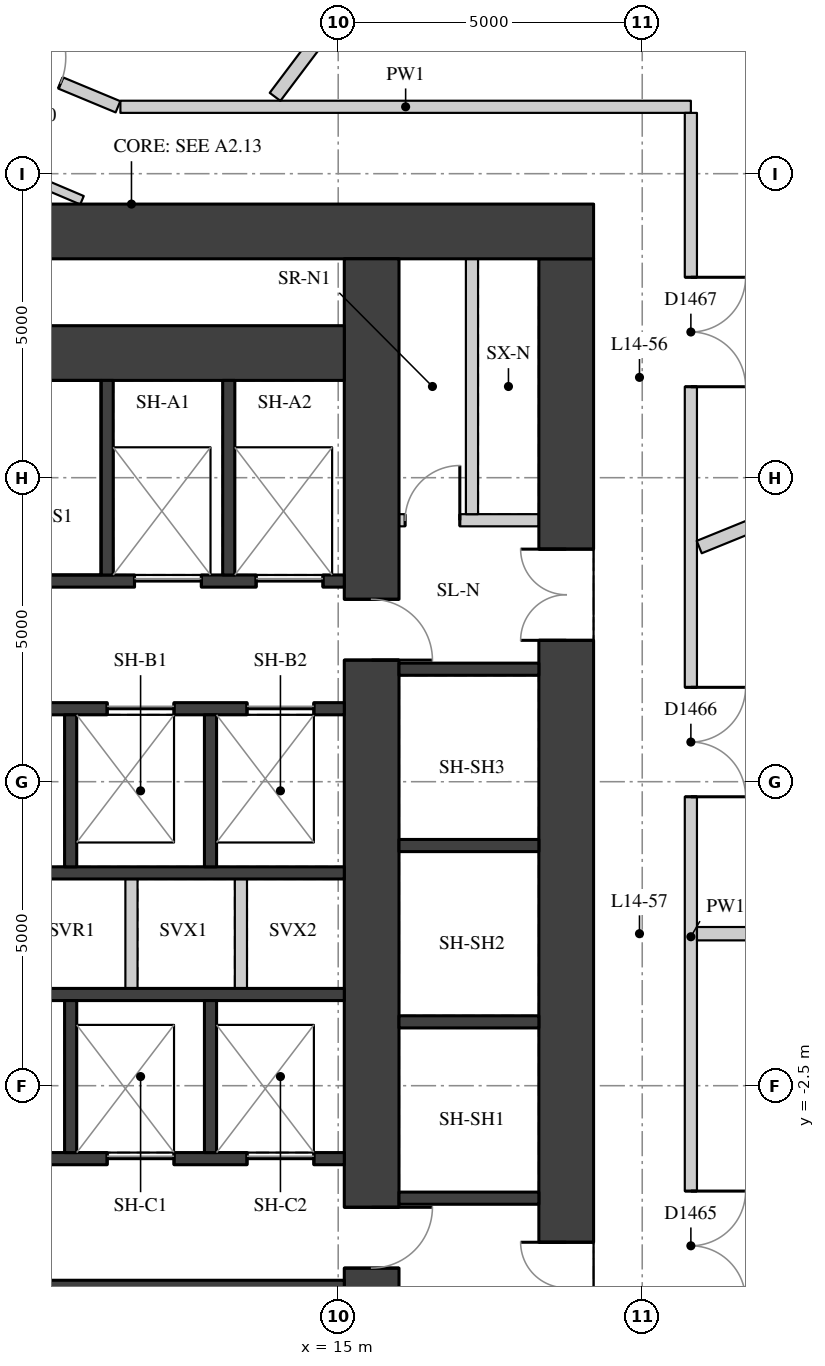
"""IFC4 building model, lengths in metres.
Left out: names, types, materials, properties, quantities, classifications, styles, units other than length and angle.
Written with IfcOpenShell. Run it as: python <this file> out.ifc"""

import sys

from ifc_helpers import new_model, si_unit, direction, frame, frame_2d, origin, place, context, subcontext, project, spatial, rectangle, extrude, element, fill, save


model = new_model("IFC4")
c1 = context("Model", 3, precision=1e-05, world=origin(), true_north=direction((0.0, 1.0)))
c2 = subcontext(c1, "Body", "Model", "MODEL_VIEW")
j1 = project(units=[si_unit("LENGTHUNIT", "METRE"), si_unit("PLANEANGLEUNIT", "RADIAN")], contexts=[c1])
p1 = place(None, origin())
s1 = spatial("IfcSite", under=j1, at=p1, CompositionType="ELEMENT")
p2 = place(p1, origin())
s2 = spatial("IfcBuilding", under=s1, at=p2, CompositionType="ELEMENT")
p3 = place(p2, frame((0.0, 0.0, 54.7)))
s3 = spatial("IfcBuildingStorey", under=s2, at=p3, CompositionType="ELEMENT", Elevation=54.7)
p4 = place(p3, frame((18.75, -11.1, 0.0), z_axis=(0.0, 0.0, 1.0), x_axis=(0.0, 1.0, 0.0)))
e1 = element("IfcWall", 1, at=p4, inside=s3, PredefinedType="SHEAR", context=c2, shape_type="SweptSolid", body=[
    extrude(rectangle(XDim=22.2, YDim=0.9, at=frame_2d((11.1, 0.0))), origin(), (0.0, 0.0, 1.0), 3.02),
])
p5 = place(p4, frame((15.925, 0.0, 0.0)))
e2 = element("IfcOpeningElement", 2, at=p5, cuts=e1, PredefinedType="OPENING", context=c2, shape_type="SweptSolid", body=[
    extrude(rectangle(XDim=1.5, YDim=2.1, at=frame_2d((0.75, 1.05))), frame((0.0, 0.46, 0.0), z_axis=(0.0, -1.0, 0.0), x_axis=(1.0, 0.0, 0.0)), (0.0, 0.0, 1.0), 0.92),
])
p6 = place(p4, frame((4.525, 0.0, 0.0)))
e3 = element("IfcOpeningElement", 3, at=p6, cuts=e1, PredefinedType="OPENING", context=c2, shape_type="SweptSolid", body=[
    extrude(rectangle(XDim=1.5, YDim=2.1, at=frame_2d((0.75, 1.05))), frame((0.0, 0.46, 0.0), z_axis=(0.0, -1.0, 0.0), x_axis=(1.0, 0.0, 0.0)), (0.0, 0.0, 1.0), 0.92),
])
p7 = place(p3, frame((4.0, 11.55, 0.0), z_axis=(0.0, 0.0, 1.0), x_axis=(1.0, 0.0, 0.0)))
e4 = element("IfcWall", 4, at=p7, inside=s3, PredefinedType="SHEAR", context=c2, shape_type="SweptSolid", body=[
    extrude(rectangle(XDim=15.2, YDim=0.9, at=frame_2d((7.6, 0.0))), origin(), (0.0, 0.0, 1.0), 3.02),
])
p8 = place(p3, frame((15.55, -11.1, 0.0), z_axis=(0.0, 0.0, 1.0), x_axis=(0.0, 1.0, 0.0)))
e5 = element("IfcWall", 5, at=p8, inside=s3, PredefinedType="SHEAR", context=c2, shape_type="SweptSolid", body=[
    extrude(rectangle(XDim=22.2, YDim=0.9, at=frame_2d((11.1, 0.0))), origin(), (0.0, 0.0, 1.0), 3.02),
])
p9 = place(p8, frame((15.6, 0.0, 0.0)))
e6 = element("IfcOpeningElement", 6, at=p9, cuts=e5, PredefinedType="OPENING", context=c2, shape_type="SweptSolid", body=[
    extrude(rectangle(XDim=1.0, YDim=2.1, at=frame_2d((0.5, 1.05))), frame((0.0, 0.46, 0.0), z_axis=(0.0, -1.0, 0.0), x_axis=(1.0, 0.0, 0.0)), (0.0, 0.0, 1.0), 0.92),
])
p10 = place(p8, frame((5.6, 0.0, 0.0)))
e7 = element("IfcOpeningElement", 7, at=p10, cuts=e5, PredefinedType="OPENING", context=c2, shape_type="SweptSolid", body=[
    extrude(rectangle(XDim=1.0, YDim=2.1, at=frame_2d((0.5, 1.05))), frame((0.0, 0.46, 0.0), z_axis=(0.0, -1.0, 0.0), x_axis=(1.0, 0.0, 0.0)), (0.0, 0.0, 1.0), 0.92),
])
p11 = place(p3, frame((4.9, 9.55, 0.0), z_axis=(0.0, 0.0, 1.0), x_axis=(1.0, 0.0, 0.0)))
e8 = element("IfcWall", 8, at=p11, inside=s3, PredefinedType="SHEAR", context=c2, shape_type="SweptSolid", body=[
    extrude(rectangle(XDim=10.2, YDim=0.9, at=frame_2d((5.1, 0.0))), origin(), (0.0, 0.0, 1.0), 3.02),
])
p12 = place(p3, frame((4.9, 5.8, 0.0), z_axis=(0.0, 0.0, 1.0), x_axis=(1.0, 0.0, 0.0)))
e9 = element("IfcWall", 9, at=p12, inside=s3, PredefinedType="SHEAR", context=c2, shape_type="SweptSolid", body=[
    extrude(rectangle(XDim=10.2, YDim=0.2, at=frame_2d((5.1, 0.0))), origin(), (0.0, 0.0, 1.0), 3.02),
])
p13 = place(p12, frame((6.75, 0.0, 0.0)))
e10 = element("IfcOpeningElement", 10, at=p13, cuts=e9, PredefinedType="OPENING", context=c2, shape_type="SweptSolid", body=[
    extrude(rectangle(XDim=1.1, YDim=2.1, at=frame_2d((0.55, 1.05))), frame((0.0, 0.11, 0.0), z_axis=(0.0, -1.0, 0.0), x_axis=(1.0, 0.0, 0.0)), (0.0, 0.0, 1.0), 0.22),
])
p14 = place(p12, frame((8.75, 0.0, 0.0)))
e11 = element("IfcOpeningElement", 11, at=p14, cuts=e9, PredefinedType="OPENING", context=c2, shape_type="SweptSolid", body=[
    extrude(rectangle(XDim=1.1, YDim=2.1, at=frame_2d((0.55, 1.05))), frame((0.0, 0.11, 0.0), z_axis=(0.0, -1.0, 0.0), x_axis=(1.0, 0.0, 0.0)), (0.0, 0.0, 1.0), 0.22),
])
p15 = place(p3, frame((4.9, 3.7, 0.0), z_axis=(0.0, 0.0, 1.0), x_axis=(1.0, 0.0, 0.0)))
e12 = element("IfcWall", 12, at=p15, inside=s3, PredefinedType="SHEAR", context=c2, shape_type="SweptSolid", body=[
    extrude(rectangle(XDim=10.2, YDim=0.2, at=frame_2d((5.1, 0.0))), origin(), (0.0, 0.0, 1.0), 3.02),
])
p16 = place(p15, frame((6.3, 0.0, 0.0)))
e13 = element("IfcOpeningElement", 13, at=p16, cuts=e12, PredefinedType="OPENING", context=c2, shape_type="SweptSolid", body=[
    extrude(rectangle(XDim=1.1, YDim=2.1, at=frame_2d((0.55, 1.05))), frame((0.0, 0.11, 0.0), z_axis=(0.0, -1.0, 0.0), x_axis=(1.0, 0.0, 0.0)), (0.0, 0.0, 1.0), 0.22),
])
p17 = place(p15, frame((8.6, 0.0, 0.0)))
e14 = element("IfcOpeningElement", 14, at=p17, cuts=e12, PredefinedType="OPENING", context=c2, shape_type="SweptSolid", body=[
    extrude(rectangle(XDim=1.1, YDim=2.1, at=frame_2d((0.55, 1.05))), frame((0.0, 0.11, 0.0), z_axis=(0.0, -1.0, 0.0), x_axis=(1.0, 0.0, 0.0)), (0.0, 0.0, 1.0), 0.22),
])
for number, where, z_axis, x_axis in (
    (15, (4.9, 1.0, 0.0), (0.0, 0.0, 1.0), (1.0, 0.0, 0.0)),
    (16, (4.9, -1.0, 0.0), (0.0, 0.0, 1.0), (1.0, 0.0, 0.0)),
):
    element("IfcWall", number, at=place(p3, frame(where, z_axis=z_axis, x_axis=x_axis)), inside=s3, PredefinedType="SHEAR", context=c2, shape_type="SweptSolid", body=[
        extrude(rectangle(XDim=10.2, YDim=0.2, at=frame_2d((5.1, 0.0))), origin(), (0.0, 0.0, 1.0), 3.02),
    ])
p18 = place(p3, frame((4.9, -3.7, 0.0), z_axis=(0.0, 0.0, 1.0), x_axis=(1.0, 0.0, 0.0)))
e17 = element("IfcWall", 17, at=p18, inside=s3, PredefinedType="SHEAR", context=c2, shape_type="SweptSolid", body=[
    extrude(rectangle(XDim=10.2, YDim=0.2, at=frame_2d((5.1, 0.0))), origin(), (0.0, 0.0, 1.0), 3.02),
])
p19 = place(p18, frame((6.3, 0.0, 0.0)))
e18 = element("IfcOpeningElement", 18, at=p19, cuts=e17, PredefinedType="OPENING", context=c2, shape_type="SweptSolid", body=[
    extrude(rectangle(XDim=1.1, YDim=2.1, at=frame_2d((0.55, 1.05))), frame((0.0, 0.11, 0.0), z_axis=(0.0, -1.0, 0.0), x_axis=(1.0, 0.0, 0.0)), (0.0, 0.0, 1.0), 0.22),
])
p20 = place(p18, frame((8.6, 0.0, 0.0)))
e19 = element("IfcOpeningElement", 19, at=p20, cuts=e17, PredefinedType="OPENING", context=c2, shape_type="SweptSolid", body=[
    extrude(rectangle(XDim=1.1, YDim=2.1, at=frame_2d((0.55, 1.05))), frame((0.0, 0.11, 0.0), z_axis=(0.0, -1.0, 0.0), x_axis=(1.0, 0.0, 0.0)), (0.0, 0.0, 1.0), 0.22),
])
p21 = place(p3, frame((4.9, -5.8, 0.0), z_axis=(0.0, 0.0, 1.0), x_axis=(1.0, 0.0, 0.0)))
e20 = element("IfcWall", 20, at=p21, inside=s3, PredefinedType="SHEAR", context=c2, shape_type="SweptSolid", body=[
    extrude(rectangle(XDim=10.2, YDim=0.2, at=frame_2d((5.1, 0.0))), origin(), (0.0, 0.0, 1.0), 3.02),
])
for number, where, z_axis, x_axis in (
    (21, (11.2, 5.9, 0.0), (0.0, 0.0, 1.0), (0.0, 1.0, 0.0)),
    (22, (13.2, 5.9, 0.0), (0.0, 0.0, 1.0), (0.0, 1.0, 0.0)),
):
    element("IfcWall", number, at=place(p3, frame(where, z_axis=z_axis, x_axis=x_axis)), inside=s3, PredefinedType="SHEAR", context=c2, shape_type="SweptSolid", body=[
        extrude(rectangle(XDim=3.2, YDim=0.2, at=frame_2d((1.6, 0.0))), origin(), (0.0, 0.0, 1.0), 3.02),
    ])
for number, where, z_axis, x_axis in (
    (23, (10.6, 1.1, 0.0), (0.0, 0.0, 1.0), (0.0, 1.0, 0.0)),
    (24, (10.6, -3.6, 0.0), (0.0, 0.0, 1.0), (0.0, 1.0, 0.0)),
    (25, (12.9, 1.1, 0.0), (0.0, 0.0, 1.0), (0.0, 1.0, 0.0)),
    (26, (12.9, -3.6, 0.0), (0.0, 0.0, 1.0), (0.0, 1.0, 0.0)),
):
    element("IfcWall", number, at=place(p3, frame(where, z_axis=z_axis, x_axis=x_axis)), inside=s3, PredefinedType="SHEAR", context=c2, shape_type="SweptSolid", body=[
        extrude(rectangle(XDim=2.5, YDim=0.2, at=frame_2d((1.25, 0.0))), origin(), (0.0, 0.0, 1.0), 3.02),
    ])
for number, where, z_axis, x_axis in (
    (27, (11.6, -0.9, 0.0), (0.0, 0.0, 1.0), (0.0, 1.0, 0.0)),
    (28, (13.4, -0.9, 0.0), (0.0, 0.0, 1.0), (0.0, 1.0, 0.0)),
):
    element("IfcWall", number, at=place(p3, frame(where, z_axis=z_axis, x_axis=x_axis)), inside=s3, PredefinedType="PARTITIONING", context=c2, shape_type="SweptSolid", body=[
        extrude(rectangle(XDim=1.8, YDim=0.2, at=frame_2d((0.9, 0.0))), origin(), (0.0, 0.0, 1.0), 3.02),
    ])
for number, where, z_axis, x_axis in (
    (29, (16.0, -4.35, 0.0), (0.0, 0.0, 1.0), (1.0, 0.0, 0.0)),
    (30, (16.0, -1.45, 0.0), (0.0, 0.0, 1.0), (1.0, 0.0, 0.0)),
    (31, (16.0, 1.45, 0.0), (0.0, 0.0, 1.0), (1.0, 0.0, 0.0)),
    (32, (16.0, 4.35, 0.0), (0.0, 0.0, 1.0), (1.0, 0.0, 0.0)),
):
    element("IfcWall", number, at=place(p3, frame(where, z_axis=z_axis, x_axis=x_axis)), inside=s3, PredefinedType="SHEAR", context=c2, shape_type="SweptSolid", body=[
        extrude(rectangle(XDim=2.3, YDim=0.2, at=frame_2d((1.15, 0.0))), origin(), (0.0, 0.0, 1.0), 3.02),
    ])
p22 = place(p3, frame((16.0, 6.8, 0.0), z_axis=(0.0, 0.0, 1.0), x_axis=(1.0, 0.0, 0.0)))
e33 = element("IfcWall", 33, at=p22, inside=s3, PredefinedType="PARTITIONING", context=c2, shape_type="SweptSolid", body=[
    extrude(rectangle(XDim=2.3, YDim=0.2, at=frame_2d((1.15, 0.0))), origin(), (0.0, 0.0, 1.0), 3.02),
])
p23 = place(p22, frame((0.1, 0.0, 0.0)))
e34 = element("IfcOpeningElement", 34, at=p23, cuts=e33, PredefinedType="OPENING", context=c2, shape_type="SweptSolid", body=[
    extrude(rectangle(XDim=0.9, YDim=2.1, at=frame_2d((0.45, 1.05))), frame((0.0, 0.11, 0.0), z_axis=(0.0, -1.0, 0.0), x_axis=(1.0, 0.0, 0.0)), (0.0, 0.0, 1.0), 0.22),
])
p24 = place(p3, frame((17.2, 6.9, 0.0), z_axis=(0.0, 0.0, 1.0), x_axis=(0.0, 1.0, 0.0)))
e35 = element("IfcWall", 35, at=p24, inside=s3, PredefinedType="PARTITIONING", context=c2, shape_type="SweptSolid", body=[
    extrude(rectangle(XDim=4.2, YDim=0.2, at=frame_2d((2.1, 0.0))), origin(), (0.0, 0.0, 1.0), 3.02),
])
p25 = place(p3, frame((3.739, 16.776, 0.0), z_axis=(0.0, 0.0, 1.0), x_axis=(0.923364778497, -0.383923802117, 0.0)))
e36 = element("IfcWall", 36, at=p25, inside=s3, PredefinedType="PARTITIONING", context=c2, shape_type="SweptSolid", body=[
    extrude(rectangle(XDim=8.273, YDim=0.2, at=frame_2d((4.137, 0.0))), origin(), (0.0, 0.0, 1.0), 3.02),
])
p26 = place(p25, frame((6.153, 0.0, 0.0)))
e37 = element("IfcOpeningElement", 37, at=p26, cuts=e36, PredefinedType="OPENING", context=c2, shape_type="SweptSolid", body=[
    extrude(rectangle(XDim=1.1, YDim=2.1, at=frame_2d((0.55, 1.05))), frame((0.0, 0.11, 0.0), z_axis=(0.0, -1.0, 0.0), x_axis=(1.0, 0.0, 0.0)), (0.0, 0.0, 1.0), 0.22),
])
p27 = place(p25, frame((1.298, 0.0, 0.0)))
e38 = element("IfcOpeningElement", 38, at=p27, cuts=e36, PredefinedType="OPENING", context=c2, shape_type="SweptSolid", body=[
    extrude(rectangle(XDim=0.9, YDim=2.1, at=frame_2d((0.45, 1.05))), frame((0.0, 0.11, 0.0), z_axis=(0.0, -1.0, 0.0), x_axis=(1.0, 0.0, 0.0)), (0.0, 0.0, 1.0), 0.22),
])
p28 = place(p3, frame((11.418, 13.6, 0.0), z_axis=(0.0, 0.0, 1.0), x_axis=(1.0, 0.0, 0.0)))
e39 = element("IfcWall", 39, at=p28, inside=s3, PredefinedType="PARTITIONING", context=c2, shape_type="SweptSolid", body=[
    extrude(rectangle(XDim=9.382, YDim=0.2, at=frame_2d((4.691, 0.0))), origin(), (0.0, 0.0, 1.0), 3.02),
])
p29 = place(p3, frame((20.8, 13.5, 0.0), z_axis=(0.0, 0.0, 1.0), x_axis=(0.0, -1.0, 0.0)))
e40 = element("IfcWall", 40, at=p29, inside=s3, PredefinedType="PARTITIONING", context=c2, shape_type="SweptSolid", body=[
    extrude(rectangle(XDim=27.1, YDim=0.2, at=frame_2d((13.55, 0.0))), origin(), (0.0, 0.0, 1.0), 3.02),
])
p30 = place(p29, frame((17.733, 0.0, 0.0)))
e41 = element("IfcOpeningElement", 41, at=p30, cuts=e40, PredefinedType="OPENING", context=c2, shape_type="SweptSolid", body=[
    extrude(rectangle(XDim=1.8, YDim=2.1, at=frame_2d((0.9, 1.05))), frame((0.0, 0.11, 0.0), z_axis=(0.0, -1.0, 0.0), x_axis=(1.0, 0.0, 0.0)), (0.0, 0.0, 1.0), 0.22),
])
p31 = place(p29, frame((9.448, 0.0, 0.0)))
e42 = element("IfcOpeningElement", 42, at=p31, cuts=e40, PredefinedType="OPENING", context=c2, shape_type="SweptSolid", body=[
    extrude(rectangle(XDim=1.8, YDim=2.1, at=frame_2d((0.9, 1.05))), frame((0.0, 0.11, 0.0), z_axis=(0.0, -1.0, 0.0), x_axis=(1.0, 0.0, 0.0)), (0.0, 0.0, 1.0), 0.22),
])
p32 = place(p29, frame((2.704, 0.0, 0.0)))
e43 = element("IfcOpeningElement", 43, at=p32, cuts=e40, PredefinedType="OPENING", context=c2, shape_type="SweptSolid", body=[
    extrude(rectangle(XDim=1.8, YDim=2.1, at=frame_2d((0.9, 1.05))), frame((0.0, 0.11, 0.0), z_axis=(0.0, -1.0, 0.0), x_axis=(1.0, 0.0, 0.0)), (0.0, 0.0, 1.0), 0.22),
])
p33 = place(p3, frame((5.149, 14.456, 0.0), z_axis=(0.0, 0.0, 1.0), x_axis=(0.920541383735, -0.390645057348, 0.0)))
e44 = element("IfcWall", 44, at=p33, inside=s3, PredefinedType="PARTITIONING", context=c2, shape_type="SweptSolid", body=[
    extrude(rectangle(XDim=6.124, YDim=0.15, at=frame_2d((3.062, 0.0))), origin(), (0.0, 0.0, 1.0), 3.02),
])
p34 = place(p33, frame((2.508, 0.0, 0.0)))
e45 = element("IfcOpeningElement", 45, at=p34, cuts=e44, PredefinedType="OPENING", context=c2, shape_type="SweptSolid", body=[
    extrude(rectangle(XDim=0.9, YDim=2.1, at=frame_2d((0.45, 1.05))), frame((0.0, 0.085, 0.0), z_axis=(0.0, -1.0, 0.0), x_axis=(1.0, 0.0, 0.0)), (0.0, 0.0, 1.0), 0.17),
])
p35 = place(p3, frame((27.5, 0.0, 0.0), z_axis=(0.0, 0.0, 1.0), x_axis=(-1.0, 0.0, 0.0)))
e46 = element("IfcWall", 46, at=p35, inside=s3, PredefinedType="PARTITIONING", context=c2, shape_type="SweptSolid", body=[
    extrude(rectangle(XDim=6.6, YDim=0.22, at=frame_2d((3.3, 0.0))), origin(), (0.0, 0.0, 1.0), 2.47),
])
p36 = place(p3, frame((25.851, 8.354, 0.0), z_axis=(0.0, 0.0, 1.0), x_axis=(-0.926546814299, -0.376179479653, 0.0)))
e47 = element("IfcWall", 47, at=p36, inside=s3, PredefinedType="PARTITIONING", context=c2, shape_type="SweptSolid", body=[
    extrude(rectangle(XDim=5.304, YDim=0.22, at=frame_2d((2.652, 0.0))), origin(), (0.0, 0.0, 1.0), 3.02),
])
p37 = place(p3, frame((17.708, 18.743, 0.0), z_axis=(0.0, 0.0, 1.0), x_axis=(-0.601177883261, -0.799115231164, 0.0)))
e48 = element("IfcWall", 48, at=p37, inside=s3, PredefinedType="PARTITIONING", context=c2, shape_type="SweptSolid", body=[
    extrude(rectangle(XDim=6.231, YDim=0.22, at=frame_2d((3.116, 0.0))), origin(), (0.0, 0.0, 1.0), 3.02),
])
p38 = place(p5, origin())
e49 = element("IfcDoor", 49, at=p38, inside=s3, OperationType="DOUBLE_DOOR_SINGLE_SWING", PredefinedType="DOOR", context=c2, shape_type="SweptSolid", body=[
    extrude(rectangle(XDim=1.5, YDim=2.1, at=frame_2d((0.75, 1.05))), frame((0.0, 0.025, 0.0), z_axis=(0.0, -1.0, 0.0), x_axis=(1.0, 0.0, 0.0)), (0.0, 0.0, 1.0), 0.05),
])
fill(e2, e49)
p39 = place(p6, origin())
e50 = element("IfcDoor", 50, at=p39, inside=s3, OperationType="DOUBLE_DOOR_SINGLE_SWING", PredefinedType="DOOR", context=c2, shape_type="SweptSolid", body=[
    extrude(rectangle(XDim=1.5, YDim=2.1, at=frame_2d((0.75, 1.05))), frame((0.0, 0.025, 0.0), z_axis=(0.0, -1.0, 0.0), x_axis=(1.0, 0.0, 0.0)), (0.0, 0.0, 1.0), 0.05),
])
fill(e3, e50)
p40 = place(p13, origin())
e51 = element("IfcDoor", 51, at=p40, inside=s3, OperationType="DOUBLE_DOOR_SLIDING", PredefinedType="DOOR", context=c2, shape_type="SweptSolid", body=[
    extrude(rectangle(XDim=1.1, YDim=2.1, at=frame_2d((0.55, 1.05))), frame((0.0, 0.025, 0.0), z_axis=(0.0, -1.0, 0.0), x_axis=(1.0, 0.0, 0.0)), (0.0, 0.0, 1.0), 0.05),
])
fill(e10, e51)
p41 = place(p14, origin())
e52 = element("IfcDoor", 52, at=p41, inside=s3, OperationType="DOUBLE_DOOR_SLIDING", PredefinedType="DOOR", context=c2, shape_type="SweptSolid", body=[
    extrude(rectangle(XDim=1.1, YDim=2.1, at=frame_2d((0.55, 1.05))), frame((0.0, 0.025, 0.0), z_axis=(0.0, -1.0, 0.0), x_axis=(1.0, 0.0, 0.0)), (0.0, 0.0, 1.0), 0.05),
])
fill(e11, e52)
p42 = place(p16, origin())
e53 = element("IfcDoor", 53, at=p42, inside=s3, OperationType="DOUBLE_DOOR_SLIDING", PredefinedType="DOOR", context=c2, shape_type="SweptSolid", body=[
    extrude(rectangle(XDim=1.1, YDim=2.1, at=frame_2d((0.55, 1.05))), frame((0.0, 0.025, 0.0), z_axis=(0.0, -1.0, 0.0), x_axis=(1.0, 0.0, 0.0)), (0.0, 0.0, 1.0), 0.05),
])
fill(e13, e53)
p43 = place(p17, origin())
e54 = element("IfcDoor", 54, at=p43, inside=s3, OperationType="DOUBLE_DOOR_SLIDING", PredefinedType="DOOR", context=c2, shape_type="SweptSolid", body=[
    extrude(rectangle(XDim=1.1, YDim=2.1, at=frame_2d((0.55, 1.05))), frame((0.0, 0.025, 0.0), z_axis=(0.0, -1.0, 0.0), x_axis=(1.0, 0.0, 0.0)), (0.0, 0.0, 1.0), 0.05),
])
fill(e14, e54)
p44 = place(p19, origin())
e55 = element("IfcDoor", 55, at=p44, inside=s3, OperationType="DOUBLE_DOOR_SLIDING", PredefinedType="DOOR", context=c2, shape_type="SweptSolid", body=[
    extrude(rectangle(XDim=1.1, YDim=2.1, at=frame_2d((0.55, 1.05))), frame((0.0, 0.025, 0.0), z_axis=(0.0, -1.0, 0.0), x_axis=(1.0, 0.0, 0.0)), (0.0, 0.0, 1.0), 0.05),
])
fill(e18, e55)
p45 = place(p20, origin())
e56 = element("IfcDoor", 56, at=p45, inside=s3, OperationType="DOUBLE_DOOR_SLIDING", PredefinedType="DOOR", context=c2, shape_type="SweptSolid", body=[
    extrude(rectangle(XDim=1.1, YDim=2.1, at=frame_2d((0.55, 1.05))), frame((0.0, 0.025, 0.0), z_axis=(0.0, -1.0, 0.0), x_axis=(1.0, 0.0, 0.0)), (0.0, 0.0, 1.0), 0.05),
])
fill(e19, e56)
p46 = place(p9, origin())
e57 = element("IfcDoor", 57, at=p46, inside=s3, OperationType="SINGLE_SWING_RIGHT", PredefinedType="DOOR", context=c2, shape_type="SweptSolid", body=[
    extrude(rectangle(XDim=1.0, YDim=2.1, at=frame_2d((0.5, 1.05))), frame((0.0, 0.025, 0.0), z_axis=(0.0, -1.0, 0.0), x_axis=(1.0, 0.0, 0.0)), (0.0, 0.0, 1.0), 0.05),
])
fill(e6, e57)
p47 = place(p23, origin())
e58 = element("IfcDoor", 58, at=p47, inside=s3, OperationType="SINGLE_SWING_RIGHT", PredefinedType="DOOR", context=c2, shape_type="SweptSolid", body=[
    extrude(rectangle(XDim=0.9, YDim=2.1, at=frame_2d((0.45, 1.05))), frame((0.0, 0.025, 0.0), z_axis=(0.0, -1.0, 0.0), x_axis=(1.0, 0.0, 0.0)), (0.0, 0.0, 1.0), 0.05),
])
fill(e34, e58)
p48 = place(p10, origin())
e59 = element("IfcDoor", 59, at=p48, inside=s3, OperationType="SINGLE_SWING_LEFT", PredefinedType="DOOR", context=c2, shape_type="SweptSolid", body=[
    extrude(rectangle(XDim=1.0, YDim=2.1, at=frame_2d((0.5, 1.05))), frame((0.0, 0.025, 0.0), z_axis=(0.0, -1.0, 0.0), x_axis=(1.0, 0.0, 0.0)), (0.0, 0.0, 1.0), 0.05),
])
fill(e7, e59)
p49 = place(p26, origin())
e60 = element("IfcDoor", 60, at=p49, inside=s3, OperationType="SINGLE_SWING_LEFT", PredefinedType="DOOR", context=c2, shape_type="SweptSolid", body=[
    extrude(rectangle(XDim=1.1, YDim=2.1, at=frame_2d((0.55, 1.05))), frame((0.0, 0.025, 0.0), z_axis=(0.0, -1.0, 0.0), x_axis=(1.0, 0.0, 0.0)), (0.0, 0.0, 1.0), 0.05),
])
fill(e37, e60)
p50 = place(p30, origin())
e61 = element("IfcDoor", 61, at=p50, inside=s3, OperationType="DOUBLE_DOOR_SINGLE_SWING", PredefinedType="DOOR", context=c2, shape_type="SweptSolid", body=[
    extrude(rectangle(XDim=1.8, YDim=2.1, at=frame_2d((0.9, 1.05))), frame((0.0, 0.025, 0.0), z_axis=(0.0, -1.0, 0.0), x_axis=(1.0, 0.0, 0.0)), (0.0, 0.0, 1.0), 0.05),
])
fill(e41, e61)
p51 = place(p31, origin())
e62 = element("IfcDoor", 62, at=p51, inside=s3, OperationType="DOUBLE_DOOR_SINGLE_SWING", PredefinedType="DOOR", context=c2, shape_type="SweptSolid", body=[
    extrude(rectangle(XDim=1.8, YDim=2.1, at=frame_2d((0.9, 1.05))), frame((0.0, 0.025, 0.0), z_axis=(0.0, -1.0, 0.0), x_axis=(1.0, 0.0, 0.0)), (0.0, 0.0, 1.0), 0.05),
])
fill(e42, e62)
p52 = place(p32, origin())
e63 = element("IfcDoor", 63, at=p52, inside=s3, OperationType="DOUBLE_DOOR_SINGLE_SWING", PredefinedType="DOOR", context=c2, shape_type="SweptSolid", body=[
    extrude(rectangle(XDim=1.8, YDim=2.1, at=frame_2d((0.9, 1.05))), frame((0.0, 0.025, 0.0), z_axis=(0.0, -1.0, 0.0), x_axis=(1.0, 0.0, 0.0)), (0.0, 0.0, 1.0), 0.05),
])
fill(e43, e63)
save(model, sys.argv[1])
